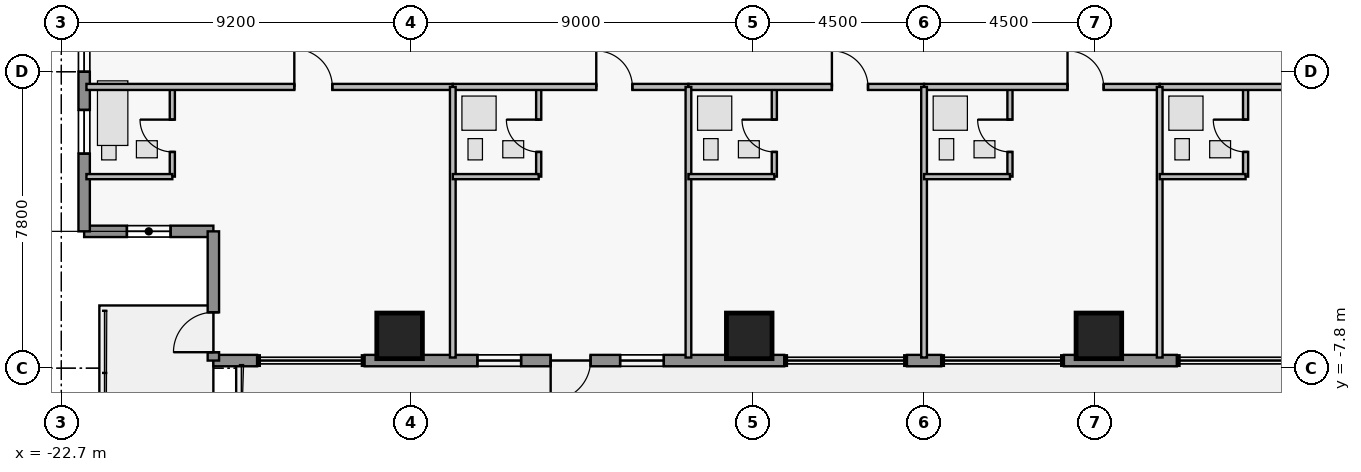
"""IFC4 building model, lengths in metres.
Left out: names, types, materials, properties, quantities, classifications, styles, units other than length and angle.
Written with IfcOpenShell. Run it as: python <this file> out.ifc"""

import sys

from ifc_helpers import new_model, si_unit, direction, frame, frame_2d, origin, origin_2d, place, context, subcontext, project, spatial, rectangle, extrude, element, fill, save


model = new_model("IFC4")
c1 = context("Model", 3, precision=1e-05, world=origin(), true_north=direction((0.0, 1.0)))
c2 = subcontext(c1, "Body", "Model", "MODEL_VIEW")
j1 = project(units=[si_unit("LENGTHUNIT", "METRE"), si_unit("PLANEANGLEUNIT", "RADIAN")], contexts=[c1])
p1 = place(None, origin())
s1 = spatial("IfcSite", under=j1, at=p1, CompositionType="ELEMENT")
p2 = place(p1, origin())
s2 = spatial("IfcBuilding", under=s1, at=p2, CompositionType="ELEMENT")
p3 = place(p2, frame((0.0, 0.0, 192.4)))
s3 = spatial("IfcBuildingStorey", under=s2, at=p3, CompositionType="ELEMENT", Elevation=192.4)
for number, where, z_axis, x_axis in (
    (1, (-13.8, -6.95, 0.0), (0.0, 0.0, 1.0), (1.0, 0.0, 0.0)),
    (2, (-4.6, -6.95, 0.0), (0.0, 0.0, 1.0), (1.0, 0.0, 0.0)),
    (3, (4.6, -6.95, 0.0), (0.0, 0.0, 1.0), (1.0, 0.0, 0.0)),
):
    element("IfcColumn", number, at=place(p3, frame(where, z_axis=z_axis, x_axis=x_axis)), inside=s3, PredefinedType="COLUMN", context=c2, shape_type="SweptSolid", body=[
        extrude(rectangle(XDim=1.2, YDim=1.2, at=origin_2d()), origin(), (0.0, 0.0, 1.0), 3.75),
    ])
p4 = place(p3, frame((-18.7, -4.2, 0.0), z_axis=(0.0, 0.0, 1.0), x_axis=(-1.0, 0.0, 0.0)))
e4 = element("IfcWall", 4, at=p4, inside=s3, PredefinedType="STANDARD", context=c2, shape_type="SweptSolid", body=[
    extrude(rectangle(XDim=3.4, YDim=0.3, at=frame_2d((1.7, 0.0))), origin(), (0.0, 0.0, 1.0), 3.53),
])
p5 = place(p4, frame((1.125, 0.0, 1.25)))
e5 = element("IfcOpeningElement", 5, at=p5, cuts=e4, PredefinedType="OPENING", context=c2, shape_type="SweptSolid", body=[
    extrude(rectangle(XDim=1.15, YDim=1.55, at=frame_2d((0.575, 0.775))), frame((0.0, 0.16, 0.0), z_axis=(0.0, -1.0, 0.0), x_axis=(1.0, 0.0, 0.0)), (0.0, 0.0, 1.0), 0.32),
])
p6 = place(p3, frame((-22.1, -4.2, 0.0), z_axis=(0.0, 0.0, 1.0), x_axis=(0.0, 1.0, 0.0)))
e6 = element("IfcWall", 6, at=p6, inside=s3, PredefinedType="STANDARD", context=c2, shape_type="SweptSolid", body=[
    extrude(rectangle(XDim=6.2, YDim=0.3, at=frame_2d((3.1, 0.0))), origin(), (0.0, 0.0, 1.0), 3.53),
])
p7 = place(p6, frame((2.045, 0.0, 0.95)))
e7 = element("IfcOpeningElement", 7, at=p7, cuts=e6, PredefinedType="OPENING", context=c2, shape_type="SweptSolid", body=[
    extrude(rectangle(XDim=1.15, YDim=1.55, at=frame_2d((0.575, 0.775))), frame((0.0, 0.16, 0.0), z_axis=(0.0, -1.0, 0.0), x_axis=(1.0, 0.0, 0.0)), (0.0, 0.0, 1.0), 0.32),
])
p8 = place(p6, frame((4.2, 0.0, 0.95)))
e8 = element("IfcOpeningElement", 8, at=p8, cuts=e6, PredefinedType="OPENING", context=c2, shape_type="SweptSolid", body=[
    extrude(rectangle(XDim=1.15, YDim=1.55, at=frame_2d((0.575, 0.775))), frame((0.0, 0.16, 0.0), z_axis=(0.0, -1.0, 0.0), x_axis=(1.0, 0.0, 0.0)), (0.0, 0.0, 1.0), 0.32),
])
p9 = place(p3, frame((6.65, -7.6, 0.0), z_axis=(0.0, 0.0, 1.0), x_axis=(-1.0, 0.0, 0.0)))
e9 = element("IfcWall", 9, at=p9, inside=s3, PredefinedType="STANDARD", context=c2, shape_type="SweptSolid", body=[
    extrude(rectangle(XDim=2.97, YDim=0.3, at=frame_2d((1.485, 0.0))), origin(), (0.0, 0.0, 1.0), 3.53),
])
p10 = place(p3, frame((0.45, -7.6, 0.0), z_axis=(0.0, 0.0, 1.0), x_axis=(-1.0, 0.0, 0.0)))
e10 = element("IfcWall", 10, at=p10, inside=s3, PredefinedType="STANDARD", context=c2, shape_type="SweptSolid", body=[
    extrude(rectangle(XDim=0.9, YDim=0.3, at=frame_2d((0.45, 0.0))), origin(), (0.0, 0.0, 1.0), 3.53),
])
p11 = place(p3, frame((-3.68, -7.6, 0.0), z_axis=(0.0, 0.0, 1.0), x_axis=(-1.0, 0.0, 0.0)))
e11 = element("IfcWall", 11, at=p11, inside=s3, PredefinedType="STANDARD", context=c2, shape_type="SweptSolid", body=[
    extrude(rectangle(XDim=11.04, YDim=0.3, at=frame_2d((5.52, 0.0))), origin(), (0.0, 0.0, 1.0), 3.53),
])
p12 = place(p11, frame((5.095, 0.0, 0.0)))
e12 = element("IfcOpeningElement", 12, at=p12, cuts=e11, PredefinedType="OPENING", context=c2, shape_type="SweptSolid", body=[
    extrude(rectangle(XDim=1.05, YDim=2.2, at=frame_2d((0.525, 1.1))), frame((0.0, 0.16, 0.0), z_axis=(0.0, -1.0, 0.0), x_axis=(1.0, 0.0, 0.0)), (0.0, 0.0, 1.0), 0.32),
])
p13 = place(p11, frame((3.167, 0.0, 0.95)))
e13 = element("IfcOpeningElement", 13, at=p13, cuts=e11, PredefinedType="OPENING", context=c2, shape_type="SweptSolid", body=[
    extrude(rectangle(XDim=1.15, YDim=1.55, at=frame_2d((0.575, 0.775))), frame((0.0, 0.16, 0.0), z_axis=(0.0, -1.0, 0.0), x_axis=(1.0, 0.0, 0.0)), (0.0, 0.0, 1.0), 0.32),
])
p14 = place(p11, frame((6.923, 0.0, 0.95)))
e14 = element("IfcOpeningElement", 14, at=p14, cuts=e11, PredefinedType="OPENING", context=c2, shape_type="SweptSolid", body=[
    extrude(rectangle(XDim=1.15, YDim=1.55, at=frame_2d((0.575, 0.775))), frame((0.0, 0.16, 0.0), z_axis=(0.0, -1.0, 0.0), x_axis=(1.0, 0.0, 0.0)), (0.0, 0.0, 1.0), 0.32),
])
p15 = place(p3, frame((-17.55, -7.6, 0.0), z_axis=(0.0, 0.0, 1.0), x_axis=(-1.0, 0.0, 0.0)))
e15 = element("IfcWall", 15, at=p15, inside=s3, PredefinedType="STANDARD", context=c2, shape_type="SweptSolid", body=[
    extrude(rectangle(XDim=1.15, YDim=0.3, at=frame_2d((0.575, 0.0))), origin(), (0.0, 0.0, 1.0), 3.53),
])
p16 = place(p3, frame((-18.7, -7.6, 0.0), z_axis=(0.0, 0.0, 1.0), x_axis=(0.0, 1.0, 0.0)))
e16 = element("IfcWall", 16, at=p16, inside=s3, PredefinedType="STANDARD", context=c2, shape_type="SweptSolid", body=[
    extrude(rectangle(XDim=3.4, YDim=0.3, at=frame_2d((1.7, 0.0))), origin(), (0.0, 0.0, 1.0), 3.53),
])
p17 = place(p16, frame((0.22, 0.0, 0.0)))
e17 = element("IfcOpeningElement", 17, at=p17, cuts=e16, PredefinedType="OPENING", context=c2, shape_type="SweptSolid", body=[
    extrude(rectangle(XDim=1.05, YDim=2.2, at=frame_2d((0.525, 1.1))), frame((0.0, 0.16, 0.0), z_axis=(0.0, -1.0, 0.0), x_axis=(1.0, 0.0, 0.0)), (0.0, 0.0, 1.0), 0.32),
])
p18 = place(p3, frame((-19.78, -2.76, 0.0), z_axis=(0.0, 0.0, 1.0), x_axis=(0.0, 1.0, 0.0)))
e18 = element("IfcWall", 18, at=p18, inside=s3, PredefinedType="PLUMBINGWALL", context=c2, shape_type="SweptSolid", body=[
    extrude(rectangle(XDim=2.36, YDim=0.135, at=frame_2d((1.18, 0.0))), origin(), (0.0, 0.0, 1.0), 3.53),
])
p19 = place(p18, frame((0.65, 0.0, 0.0)))
e19 = element("IfcOpeningElement", 19, at=p19, cuts=e18, PredefinedType="OPENING", context=c2, shape_type="SweptSolid", body=[
    extrude(rectangle(XDim=0.85, YDim=2.1, at=frame_2d((0.425, 1.05))), frame((0.0, 0.077, 0.0), z_axis=(0.0, -1.0, 0.0), x_axis=(1.0, 0.0, 0.0)), (0.0, 0.0, 1.0), 0.155),
])
p20 = place(p3, frame((-22.04, -0.4, 0.0), z_axis=(0.0, 0.0, 1.0), x_axis=(1.0, 0.0, 0.0)))
e20 = element("IfcWall", 20, at=p20, inside=s3, PredefinedType="PARTITIONING", context=c2, shape_type="SweptSolid", body=[
    extrude(rectangle(XDim=9.64, YDim=0.16, at=frame_2d((4.82, 0.0))), origin(), (0.0, 0.0, 1.0), 3.53),
])
p21 = place(p20, frame((5.47, 0.0, 0.0)))
e21 = element("IfcOpeningElement", 21, at=p21, cuts=e20, PredefinedType="OPENING", context=c2, shape_type="SweptSolid", body=[
    extrude(rectangle(XDim=1.0, YDim=2.15, at=frame_2d((0.5, 1.075))), frame((0.0, 0.09, 0.0), z_axis=(0.0, -1.0, 0.0), x_axis=(1.0, 0.0, 0.0)), (0.0, 0.0, 1.0), 0.18),
])
p22 = place(p3, frame((-10.14, -2.76, 0.0), z_axis=(0.0, 0.0, 1.0), x_axis=(0.0, 1.0, 0.0)))
e22 = element("IfcWall", 22, at=p22, inside=s3, PredefinedType="PLUMBINGWALL", context=c2, shape_type="SweptSolid", body=[
    extrude(rectangle(XDim=2.36, YDim=0.135, at=frame_2d((1.18, 0.0))), origin(), (0.0, 0.0, 1.0), 3.53),
])
p23 = place(p22, frame((0.65, 0.0, 0.0)))
e23 = element("IfcOpeningElement", 23, at=p23, cuts=e22, PredefinedType="OPENING", context=c2, shape_type="SweptSolid", body=[
    extrude(rectangle(XDim=0.85, YDim=2.1, at=frame_2d((0.425, 1.05))), frame((0.0, 0.077, 0.0), z_axis=(0.0, -1.0, 0.0), x_axis=(1.0, 0.0, 0.0)), (0.0, 0.0, 1.0), 0.155),
])
p24 = place(p3, frame((-12.4, -0.4, 0.0), z_axis=(0.0, 0.0, 1.0), x_axis=(1.0, 0.0, 0.0)))
e24 = element("IfcWall", 24, at=p24, inside=s3, PredefinedType="PARTITIONING", context=c2, shape_type="SweptSolid", body=[
    extrude(rectangle(XDim=6.2, YDim=0.16, at=frame_2d((3.1, 0.0))), origin(), (0.0, 0.0, 1.0), 3.53),
])
p25 = place(p24, frame((3.775, 0.0, 0.0)))
e25 = element("IfcOpeningElement", 25, at=p25, cuts=e24, PredefinedType="OPENING", context=c2, shape_type="SweptSolid", body=[
    extrude(rectangle(XDim=0.95, YDim=2.15, at=frame_2d((0.475, 1.075))), frame((0.0, 0.09, 0.0), z_axis=(0.0, -1.0, 0.0), x_axis=(1.0, 0.0, 0.0)), (0.0, 0.0, 1.0), 0.18),
])
p26 = place(p3, frame((-3.94, -2.76, 0.0), z_axis=(0.0, 0.0, 1.0), x_axis=(0.0, 1.0, 0.0)))
e26 = element("IfcWall", 26, at=p26, inside=s3, PredefinedType="PLUMBINGWALL", context=c2, shape_type="SweptSolid", body=[
    extrude(rectangle(XDim=2.36, YDim=0.135, at=frame_2d((1.18, 0.0))), origin(), (0.0, 0.0, 1.0), 3.53),
])
p27 = place(p26, frame((0.65, 0.0, 0.0)))
e27 = element("IfcOpeningElement", 27, at=p27, cuts=e26, PredefinedType="OPENING", context=c2, shape_type="SweptSolid", body=[
    extrude(rectangle(XDim=0.85, YDim=2.1, at=frame_2d((0.425, 1.05))), frame((0.0, 0.077, 0.0), z_axis=(0.0, -1.0, 0.0), x_axis=(1.0, 0.0, 0.0)), (0.0, 0.0, 1.0), 0.155),
])
p28 = place(p3, frame((-6.2, -0.4, 0.0), z_axis=(0.0, 0.0, 1.0), x_axis=(1.0, 0.0, 0.0)))
e28 = element("IfcWall", 28, at=p28, inside=s3, PredefinedType="PARTITIONING", context=c2, shape_type="SweptSolid", body=[
    extrude(rectangle(XDim=6.2, YDim=0.16, at=frame_2d((3.1, 0.0))), origin(), (0.0, 0.0, 1.0), 3.53),
])
p29 = place(p28, frame((3.775, 0.0, 0.0)))
e29 = element("IfcOpeningElement", 29, at=p29, cuts=e28, PredefinedType="OPENING", context=c2, shape_type="SweptSolid", body=[
    extrude(rectangle(XDim=0.95, YDim=2.15, at=frame_2d((0.475, 1.075))), frame((0.0, 0.09, 0.0), z_axis=(0.0, -1.0, 0.0), x_axis=(1.0, 0.0, 0.0)), (0.0, 0.0, 1.0), 0.18),
])
p30 = place(p3, frame((2.26, -2.76, 0.0), z_axis=(0.0, 0.0, 1.0), x_axis=(0.0, 1.0, 0.0)))
e30 = element("IfcWall", 30, at=p30, inside=s3, PredefinedType="PLUMBINGWALL", context=c2, shape_type="SweptSolid", body=[
    extrude(rectangle(XDim=2.36, YDim=0.135, at=frame_2d((1.18, 0.0))), origin(), (0.0, 0.0, 1.0), 3.53),
])
p31 = place(p30, frame((0.65, 0.0, 0.0)))
e31 = element("IfcOpeningElement", 31, at=p31, cuts=e30, PredefinedType="OPENING", context=c2, shape_type="SweptSolid", body=[
    extrude(rectangle(XDim=0.85, YDim=2.1, at=frame_2d((0.425, 1.05))), frame((0.0, 0.077, 0.0), z_axis=(0.0, -1.0, 0.0), x_axis=(1.0, 0.0, 0.0)), (0.0, 0.0, 1.0), 0.155),
])
p32 = place(p3, frame((0.0, -0.4, 0.0), z_axis=(0.0, 0.0, 1.0), x_axis=(1.0, 0.0, 0.0)))
e32 = element("IfcWall", 32, at=p32, inside=s3, PredefinedType="PARTITIONING", context=c2, shape_type="SweptSolid", body=[
    extrude(rectangle(XDim=6.2, YDim=0.16, at=frame_2d((3.1, 0.0))), origin(), (0.0, 0.0, 1.0), 3.53),
])
p33 = place(p32, frame((3.775, 0.0, 0.0)))
e33 = element("IfcOpeningElement", 33, at=p33, cuts=e32, PredefinedType="OPENING", context=c2, shape_type="SweptSolid", body=[
    extrude(rectangle(XDim=0.95, YDim=2.15, at=frame_2d((0.475, 1.075))), frame((0.0, 0.09, 0.0), z_axis=(0.0, -1.0, 0.0), x_axis=(1.0, 0.0, 0.0)), (0.0, 0.0, 1.0), 0.18),
])
p34 = place(p3, frame((8.46, -2.76, 0.0), z_axis=(0.0, 0.0, 1.0), x_axis=(0.0, 1.0, 0.0)))
e34 = element("IfcWall", 34, at=p34, inside=s3, PredefinedType="PLUMBINGWALL", context=c2, shape_type="SweptSolid", body=[
    extrude(rectangle(XDim=2.36, YDim=0.135, at=frame_2d((1.18, 0.0))), origin(), (0.0, 0.0, 1.0), 3.53),
])
p35 = place(p34, frame((0.65, 0.0, 0.0)))
e35 = element("IfcOpeningElement", 35, at=p35, cuts=e34, PredefinedType="OPENING", context=c2, shape_type="SweptSolid", body=[
    extrude(rectangle(XDim=0.85, YDim=2.1, at=frame_2d((0.425, 1.05))), frame((0.0, 0.077, 0.0), z_axis=(0.0, -1.0, 0.0), x_axis=(1.0, 0.0, 0.0)), (0.0, 0.0, 1.0), 0.155),
])
p36 = place(p3, frame((6.2, -0.4, 0.0), z_axis=(0.0, 0.0, 1.0), x_axis=(1.0, 0.0, 0.0)))
e36 = element("IfcWall", 36, at=p36, inside=s3, PredefinedType="PARTITIONING", context=c2, shape_type="SweptSolid", body=[
    extrude(rectangle(XDim=6.2, YDim=0.16, at=frame_2d((3.1, 0.0))), origin(), (0.0, 0.0, 1.0), 3.53),
])
p37 = place(p36, frame((3.775, 0.0, 0.0)))
e37 = element("IfcOpeningElement", 37, at=p37, cuts=e36, PredefinedType="OPENING", context=c2, shape_type="SweptSolid", body=[
    extrude(rectangle(XDim=0.95, YDim=2.15, at=frame_2d((0.475, 1.075))), frame((0.0, 0.09, 0.0), z_axis=(0.0, -1.0, 0.0), x_axis=(1.0, 0.0, 0.0)), (0.0, 0.0, 1.0), 0.18),
])
p38 = place(p3, frame((-22.04, -2.76, 0.0), z_axis=(0.0, 0.0, 1.0), x_axis=(1.0, 0.0, 0.0)))
e38 = element("IfcWall", 38, at=p38, inside=s3, PredefinedType="PLUMBINGWALL", context=c2, shape_type="SweptSolid", body=[
    extrude(rectangle(XDim=2.26, YDim=0.135, at=frame_2d((1.13, 0.0))), origin(), (0.0, 0.0, 1.0), 3.53),
])
p39 = place(p3, frame((-12.4, -7.52, 0.0), z_axis=(0.0, 0.0, 1.0), x_axis=(0.0, 1.0, 0.0)))
e39 = element("IfcWall", 39, at=p39, inside=s3, PredefinedType="PARTITIONING", context=c2, shape_type="SweptSolid", body=[
    extrude(rectangle(XDim=7.12, YDim=0.15, at=frame_2d((3.56, 0.0))), origin(), (0.0, 0.0, 1.0), 3.53),
])
p40 = place(p3, frame((-12.4, -2.76, 0.0), z_axis=(0.0, 0.0, 1.0), x_axis=(1.0, 0.0, 0.0)))
e40 = element("IfcWall", 40, at=p40, inside=s3, PredefinedType="PLUMBINGWALL", context=c2, shape_type="SweptSolid", body=[
    extrude(rectangle(XDim=2.26, YDim=0.135, at=frame_2d((1.13, 0.0))), origin(), (0.0, 0.0, 1.0), 3.124),
])
p41 = place(p3, frame((-6.2, -7.52, 0.0), z_axis=(0.0, 0.0, 1.0), x_axis=(0.0, 1.0, 0.0)))
e41 = element("IfcWall", 41, at=p41, inside=s3, PredefinedType="PARTITIONING", context=c2, shape_type="SweptSolid", body=[
    extrude(rectangle(XDim=7.12, YDim=0.15, at=frame_2d((3.56, 0.0))), origin(), (0.0, 0.0, 1.0), 3.53),
])
p42 = place(p3, frame((-6.2, -2.76, 0.0), z_axis=(0.0, 0.0, 1.0), x_axis=(1.0, 0.0, 0.0)))
e42 = element("IfcWall", 42, at=p42, inside=s3, PredefinedType="PLUMBINGWALL", context=c2, shape_type="SweptSolid", body=[
    extrude(rectangle(XDim=2.26, YDim=0.135, at=frame_2d((1.13, 0.0))), origin(), (0.0, 0.0, 1.0), 3.124),
])
p43 = place(p3, frame((0.0, -7.52, 0.0), z_axis=(0.0, 0.0, 1.0), x_axis=(0.0, 1.0, 0.0)))
e43 = element("IfcWall", 43, at=p43, inside=s3, PredefinedType="PARTITIONING", context=c2, shape_type="SweptSolid", body=[
    extrude(rectangle(XDim=7.12, YDim=0.15, at=frame_2d((3.56, 0.0))), origin(), (0.0, 0.0, 1.0), 3.53),
])
p44 = place(p3, frame((0.0, -2.76, 0.0), z_axis=(0.0, 0.0, 1.0), x_axis=(1.0, 0.0, 0.0)))
e44 = element("IfcWall", 44, at=p44, inside=s3, PredefinedType="PLUMBINGWALL", context=c2, shape_type="SweptSolid", body=[
    extrude(rectangle(XDim=2.26, YDim=0.135, at=frame_2d((1.13, 0.0))), origin(), (0.0, 0.0, 1.0), 3.124),
])
p45 = place(p3, frame((6.2, -7.52, 0.0), z_axis=(0.0, 0.0, 1.0), x_axis=(0.0, 1.0, 0.0)))
e45 = element("IfcWall", 45, at=p45, inside=s3, PredefinedType="PARTITIONING", context=c2, shape_type="SweptSolid", body=[
    extrude(rectangle(XDim=7.12, YDim=0.15, at=frame_2d((3.56, 0.0))), origin(), (0.0, 0.0, 1.0), 3.53),
])
p46 = place(p3, frame((6.2, -2.76, 0.0), z_axis=(0.0, 0.0, 1.0), x_axis=(1.0, 0.0, 0.0)))
e46 = element("IfcWall", 46, at=p46, inside=s3, PredefinedType="PLUMBINGWALL", context=c2, shape_type="SweptSolid", body=[
    extrude(rectangle(XDim=2.26, YDim=0.135, at=frame_2d((1.13, 0.0))), origin(), (0.0, 0.0, 1.0), 3.124),
])
p47 = place(p5, origin())
e47 = element("IfcWindow", 47, at=p47, inside=s3, PartitioningType="SINGLE_PANEL", PredefinedType="WINDOW", context=c2, shape_type="SweptSolid", body=[
    extrude(rectangle(XDim=1.15, YDim=1.55, at=frame_2d((0.575, 0.775))), frame((0.0, 0.03, 0.0), z_axis=(0.0, -1.0, 0.0), x_axis=(1.0, 0.0, 0.0)), (0.0, 0.0, 1.0), 0.06),
])
fill(e5, e47)
p48 = place(p7, origin())
e48 = element("IfcWindow", 48, at=p48, inside=s3, PartitioningType="SINGLE_PANEL", PredefinedType="WINDOW", context=c2, shape_type="SweptSolid", body=[
    extrude(rectangle(XDim=1.15, YDim=1.55, at=frame_2d((0.575, 0.775))), frame((0.0, 0.03, 0.0), z_axis=(0.0, -1.0, 0.0), x_axis=(1.0, 0.0, 0.0)), (0.0, 0.0, 1.0), 0.06),
])
fill(e7, e48)
p49 = place(p8, origin())
e49 = element("IfcWindow", 49, at=p49, inside=s3, PartitioningType="SINGLE_PANEL", PredefinedType="WINDOW", context=c2, shape_type="SweptSolid", body=[
    extrude(rectangle(XDim=1.15, YDim=1.55, at=frame_2d((0.575, 0.775))), frame((0.0, 0.03, 0.0), z_axis=(0.0, -1.0, 0.0), x_axis=(1.0, 0.0, 0.0)), (0.0, 0.0, 1.0), 0.06),
])
fill(e8, e49)
p50 = place(p12, origin())
e50 = element("IfcDoor", 50, at=p50, inside=s3, OperationType="SINGLE_SWING_RIGHT", PredefinedType="DOOR", context=c2, shape_type="SweptSolid", body=[
    extrude(rectangle(XDim=1.05, YDim=2.2, at=frame_2d((0.525, 1.1))), frame((0.0, 0.025, 0.0), z_axis=(0.0, -1.0, 0.0), x_axis=(1.0, 0.0, 0.0)), (0.0, 0.0, 1.0), 0.05),
])
fill(e12, e50)
p51 = place(p13, origin())
e51 = element("IfcWindow", 51, at=p51, inside=s3, PartitioningType="SINGLE_PANEL", PredefinedType="WINDOW", context=c2, shape_type="SweptSolid", body=[
    extrude(rectangle(XDim=1.15, YDim=1.55, at=frame_2d((0.575, 0.775))), frame((0.0, 0.03, 0.0), z_axis=(0.0, -1.0, 0.0), x_axis=(1.0, 0.0, 0.0)), (0.0, 0.0, 1.0), 0.06),
])
fill(e13, e51)
p52 = place(p14, origin())
e52 = element("IfcWindow", 52, at=p52, inside=s3, PartitioningType="SINGLE_PANEL", PredefinedType="WINDOW", context=c2, shape_type="SweptSolid", body=[
    extrude(rectangle(XDim=1.15, YDim=1.55, at=frame_2d((0.575, 0.775))), frame((0.0, 0.03, 0.0), z_axis=(0.0, -1.0, 0.0), x_axis=(1.0, 0.0, 0.0)), (0.0, 0.0, 1.0), 0.06),
])
fill(e14, e52)
p53 = place(p17, origin())
e53 = element("IfcDoor", 53, at=p53, inside=s3, OperationType="SINGLE_SWING_LEFT", PredefinedType="DOOR", context=c2, shape_type="SweptSolid", body=[
    extrude(rectangle(XDim=1.05, YDim=2.2, at=frame_2d((0.525, 1.1))), frame((0.0, 0.025, 0.0), z_axis=(0.0, -1.0, 0.0), x_axis=(1.0, 0.0, 0.0)), (0.0, 0.0, 1.0), 0.05),
])
fill(e17, e53)
p54 = place(p19, origin())
e54 = element("IfcDoor", 54, at=p54, inside=s3, OperationType="SINGLE_SWING_RIGHT", PredefinedType="DOOR", context=c2, shape_type="SweptSolid", body=[
    extrude(rectangle(XDim=0.85, YDim=2.1, at=frame_2d((0.425, 1.05))), frame((0.0, 0.025, 0.0), z_axis=(0.0, -1.0, 0.0), x_axis=(1.0, 0.0, 0.0)), (0.0, 0.0, 1.0), 0.05),
])
fill(e19, e54)
p55 = place(p21, origin())
e55 = element("IfcDoor", 55, at=p55, inside=s3, OperationType="SINGLE_SWING_LEFT", PredefinedType="DOOR", context=c2, shape_type="SweptSolid", body=[
    extrude(rectangle(XDim=1.0, YDim=2.15, at=frame_2d((0.5, 1.075))), frame((0.0, 0.025, 0.0), z_axis=(0.0, -1.0, 0.0), x_axis=(1.0, 0.0, 0.0)), (0.0, 0.0, 1.0), 0.05),
])
fill(e21, e55)
p56 = place(p23, origin())
e56 = element("IfcDoor", 56, at=p56, inside=s3, OperationType="SINGLE_SWING_RIGHT", PredefinedType="DOOR", context=c2, shape_type="SweptSolid", body=[
    extrude(rectangle(XDim=0.85, YDim=2.1, at=frame_2d((0.425, 1.05))), frame((0.0, 0.025, 0.0), z_axis=(0.0, -1.0, 0.0), x_axis=(1.0, 0.0, 0.0)), (0.0, 0.0, 1.0), 0.05),
])
fill(e23, e56)
p57 = place(p25, origin())
e57 = element("IfcDoor", 57, at=p57, inside=s3, OperationType="SINGLE_SWING_LEFT", PredefinedType="DOOR", context=c2, shape_type="SweptSolid", body=[
    extrude(rectangle(XDim=0.95, YDim=2.15, at=frame_2d((0.475, 1.075))), frame((0.0, 0.025, 0.0), z_axis=(0.0, -1.0, 0.0), x_axis=(1.0, 0.0, 0.0)), (0.0, 0.0, 1.0), 0.05),
])
fill(e25, e57)
p58 = place(p27, origin())
e58 = element("IfcDoor", 58, at=p58, inside=s3, OperationType="SINGLE_SWING_RIGHT", PredefinedType="DOOR", context=c2, shape_type="SweptSolid", body=[
    extrude(rectangle(XDim=0.85, YDim=2.1, at=frame_2d((0.425, 1.05))), frame((0.0, 0.025, 0.0), z_axis=(0.0, -1.0, 0.0), x_axis=(1.0, 0.0, 0.0)), (0.0, 0.0, 1.0), 0.05),
])
fill(e27, e58)
p59 = place(p29, origin())
e59 = element("IfcDoor", 59, at=p59, inside=s3, OperationType="SINGLE_SWING_LEFT", PredefinedType="DOOR", context=c2, shape_type="SweptSolid", body=[
    extrude(rectangle(XDim=0.95, YDim=2.15, at=frame_2d((0.475, 1.075))), frame((0.0, 0.025, 0.0), z_axis=(0.0, -1.0, 0.0), x_axis=(1.0, 0.0, 0.0)), (0.0, 0.0, 1.0), 0.05),
])
fill(e29, e59)
p60 = place(p31, origin())
e60 = element("IfcDoor", 60, at=p60, inside=s3, OperationType="SINGLE_SWING_RIGHT", PredefinedType="DOOR", context=c2, shape_type="SweptSolid", body=[
    extrude(rectangle(XDim=0.85, YDim=2.1, at=frame_2d((0.425, 1.05))), frame((0.0, 0.025, 0.0), z_axis=(0.0, -1.0, 0.0), x_axis=(1.0, 0.0, 0.0)), (0.0, 0.0, 1.0), 0.05),
])
fill(e31, e60)
p61 = place(p33, origin())
e61 = element("IfcDoor", 61, at=p61, inside=s3, OperationType="SINGLE_SWING_LEFT", PredefinedType="DOOR", context=c2, shape_type="SweptSolid", body=[
    extrude(rectangle(XDim=0.95, YDim=2.15, at=frame_2d((0.475, 1.075))), frame((0.0, 0.025, 0.0), z_axis=(0.0, -1.0, 0.0), x_axis=(1.0, 0.0, 0.0)), (0.0, 0.0, 1.0), 0.05),
])
fill(e33, e61)
p62 = place(p35, origin())
e62 = element("IfcDoor", 62, at=p62, inside=s3, OperationType="SINGLE_SWING_RIGHT", PredefinedType="DOOR", context=c2, shape_type="SweptSolid", body=[
    extrude(rectangle(XDim=0.85, YDim=2.1, at=frame_2d((0.425, 1.05))), frame((0.0, 0.025, 0.0), z_axis=(0.0, -1.0, 0.0), x_axis=(1.0, 0.0, 0.0)), (0.0, 0.0, 1.0), 0.05),
])
fill(e35, e62)
save(model, sys.argv[1])
